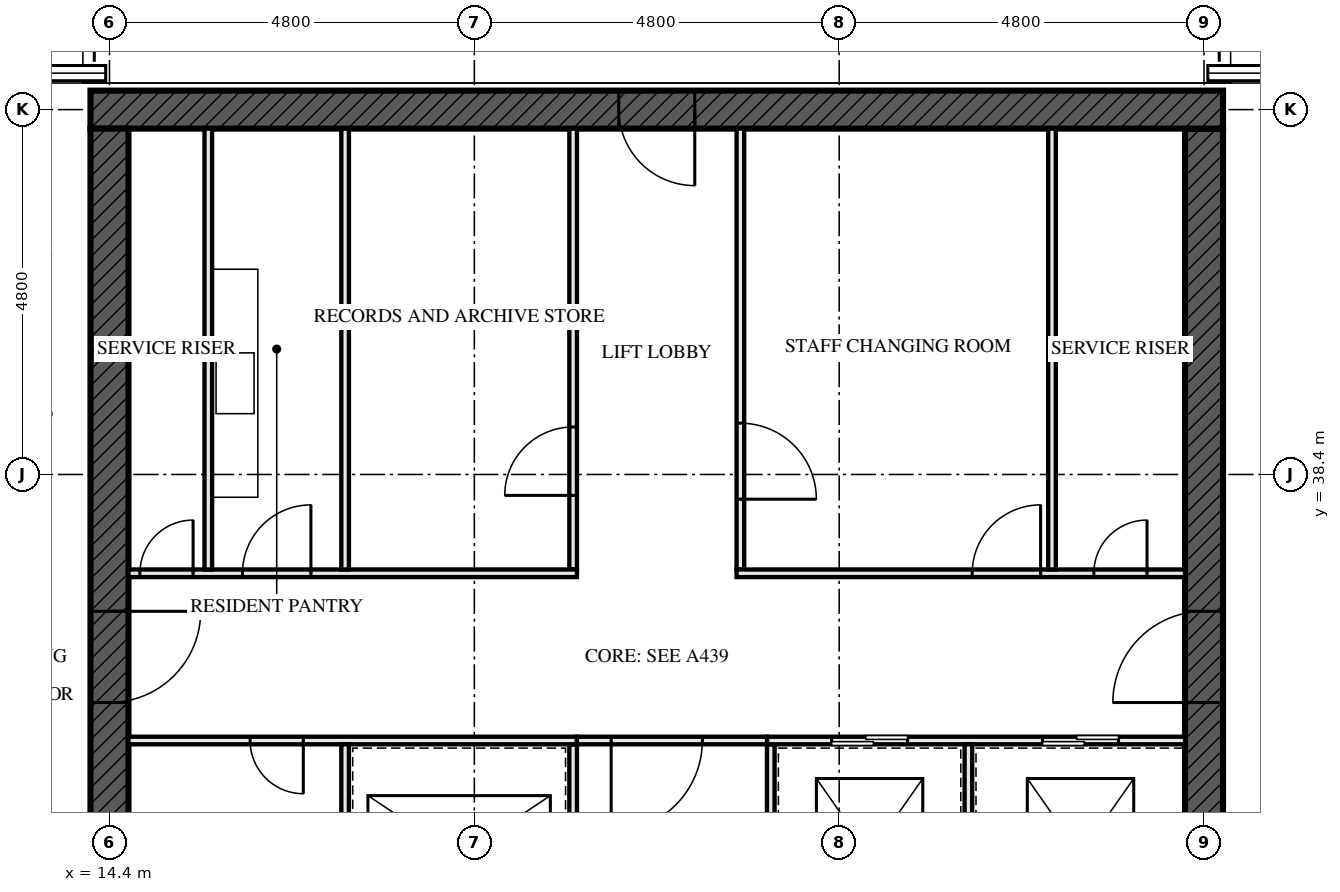
"""IFC4 building model, lengths in metres.
Left out: names, types, materials, properties, quantities, classifications, styles, units other than length and angle.
Written with IfcOpenShell. Run it as: python <this file> out.ifc"""

import sys

from ifc_helpers import new_model, si_unit, direction, frame, frame_2d, origin, place, context, subcontext, project, spatial, rectangle, extrude, element, fill, save


model = new_model("IFC4")
c1 = context("Model", 3, precision=1e-05, world=origin(), true_north=direction((0.0, 1.0)))
c2 = subcontext(c1, "Body", "Model", "MODEL_VIEW")
j1 = project(units=[si_unit("LENGTHUNIT", "METRE"), si_unit("PLANEANGLEUNIT", "RADIAN")], contexts=[c1])
p1 = place(None, origin())
s1 = spatial("IfcSite", under=j1, at=p1, CompositionType="ELEMENT")
p2 = place(p1, origin())
s2 = spatial("IfcBuilding", under=s1, at=p2, CompositionType="ELEMENT")
p3 = place(p2, frame((0.0, 0.0, 194.5)))
s3 = spatial("IfcBuildingStorey", under=s2, at=p3, CompositionType="ELEMENT", Elevation=194.5)
p4 = place(p3, frame((29.05, 43.2, -0.17), z_axis=(0.0, 0.0, 1.0), x_axis=(-1.0, 0.0, 0.0)))
e1 = element("IfcWall", 1, at=p4, inside=s3, PredefinedType="SHEAR", context=c2, shape_type="SweptSolid", body=[
    extrude(rectangle(XDim=14.9, YDim=0.5, at=frame_2d((7.45, 0.0))), origin(), (0.0, 0.0, 1.0), 3.5),
])
p5 = place(p4, frame((6.95, 0.0, 0.17)))
e2 = element("IfcOpeningElement", 2, at=p5, cuts=e1, PredefinedType="OPENING", context=c2, shape_type="SweptSolid", body=[
    extrude(rectangle(XDim=1.0, YDim=2.4, at=frame_2d((0.5, 1.2))), frame((0.0, 0.26, 0.0), z_axis=(0.0, -1.0, 0.0), x_axis=(1.0, 0.0, 0.0)), (0.0, 0.0, 1.0), 0.521),
])
p6 = place(p3, frame((14.4, 42.95, -0.17), z_axis=(0.0, 0.0, 1.0), x_axis=(0.0, -1.0, 0.0)))
e3 = element("IfcWall", 3, at=p6, inside=s3, PredefinedType="SHEAR", context=c2, shape_type="SweptSolid", body=[
    extrude(rectangle(XDim=13.9, YDim=0.5, at=frame_2d((6.95, 0.0))), origin(), (0.0, 0.0, 1.0), 3.5),
])
p7 = place(p6, frame((6.35, 0.0, 0.17)))
e4 = element("IfcOpeningElement", 4, at=p7, cuts=e3, PredefinedType="OPENING", context=c2, shape_type="SweptSolid", body=[
    extrude(rectangle(XDim=1.2, YDim=2.1, at=frame_2d((0.6, 1.05))), frame((0.0, 0.26, 0.0), z_axis=(0.0, -1.0, 0.0), x_axis=(1.0, 0.0, 0.0)), (0.0, 0.0, 1.0), 0.521),
])
p8 = place(p3, frame((28.8, 29.05, -0.17), z_axis=(0.0, 0.0, 1.0), x_axis=(0.0, 1.0, 0.0)))
e5 = element("IfcWall", 5, at=p8, inside=s3, PredefinedType="SHEAR", context=c2, shape_type="SweptSolid", body=[
    extrude(rectangle(XDim=13.9, YDim=0.5, at=frame_2d((6.95, 0.0))), origin(), (0.0, 0.0, 1.0), 3.5),
])
p9 = place(p8, frame((6.35, 0.0, 0.17)))
e6 = element("IfcOpeningElement", 6, at=p9, cuts=e5, PredefinedType="OPENING", context=c2, shape_type="SweptSolid", body=[
    extrude(rectangle(XDim=1.2, YDim=2.1, at=frame_2d((0.6, 1.05))), frame((0.0, 0.26, 0.0), z_axis=(0.0, -1.0, 0.0), x_axis=(1.0, 0.0, 0.0)), (0.0, 0.0, 1.0), 0.521),
])
for number, where, z_axis, x_axis in (
    (7, (15.7, 37.15, 0.0), (0.0, 0.0, 1.0), (0.0, 1.0, 0.0)),
    (8, (26.8, 37.15, 0.0), (0.0, 0.0, 1.0), (0.0, 1.0, 0.0)),
):
    element("IfcWall", number, at=place(p3, frame(where, z_axis=z_axis, x_axis=x_axis)), inside=s3, PredefinedType="SOLIDWALL", context=c2, shape_type="SweptSolid", body=[
        extrude(rectangle(XDim=5.8, YDim=0.1, at=frame_2d((2.9, 0.0))), origin(), (0.0, 0.0, 1.0), 3.33),
    ])
p10 = place(p3, frame((20.5, 29.05, 0.0), z_axis=(0.0, 0.0, 1.0), x_axis=(0.0, 1.0, 0.0)))
e9 = element("IfcWall", 9, at=p10, inside=s3, PredefinedType="SOLIDWALL", context=c2, shape_type="SweptSolid", body=[
    extrude(rectangle(XDim=5.8, YDim=0.1, at=frame_2d((2.9, 0.0))), origin(), (0.0, 0.0, 1.0), 3.33),
])
p11 = place(p10, frame((0.8, 0.0, 0.0)))
e10 = element("IfcOpeningElement", 10, at=p11, cuts=e9, PredefinedType="OPENING", context=c2, shape_type="SweptSolid", body=[
    extrude(rectangle(XDim=1.1, YDim=2.3, at=frame_2d((0.55, 1.15))), frame((0.0, 0.061, 0.0), z_axis=(0.0, -1.0, 0.0), x_axis=(1.0, 0.0, 0.0)), (0.0, 0.0, 1.0), 0.121),
])
p12 = place(p10, frame((3.775, 0.0, 0.0)))
e11 = element("IfcOpeningElement", 11, at=p12, cuts=e9, PredefinedType="OPENING", context=c2, shape_type="SweptSolid", body=[
    extrude(rectangle(XDim=1.1, YDim=2.3, at=frame_2d((0.55, 1.15))), frame((0.0, 0.061, 0.0), z_axis=(0.0, -1.0, 0.0), x_axis=(1.0, 0.0, 0.0)), (0.0, 0.0, 1.0), 0.121),
])
p13 = place(p3, frame((20.5, 37.15, 0.0), z_axis=(0.0, 0.0, 1.0), x_axis=(0.0, 1.0, 0.0)))
e12 = element("IfcWall", 12, at=p13, inside=s3, PredefinedType="SOLIDWALL", context=c2, shape_type="SweptSolid", body=[
    extrude(rectangle(XDim=5.8, YDim=0.1, at=frame_2d((2.9, 0.0))), origin(), (0.0, 0.0, 1.0), 3.33),
])
p14 = place(p13, frame((0.975, 0.0, 0.0)))
e13 = element("IfcOpeningElement", 13, at=p14, cuts=e12, PredefinedType="OPENING", context=c2, shape_type="SweptSolid", body=[
    extrude(rectangle(XDim=0.9, YDim=2.1, at=frame_2d((0.45, 1.05))), frame((0.0, 0.061, 0.0), z_axis=(0.0, -1.0, 0.0), x_axis=(1.0, 0.0, 0.0)), (0.0, 0.0, 1.0), 0.121),
])
p15 = place(p3, frame((22.7, 37.15, 0.0), z_axis=(0.0, 0.0, 1.0), x_axis=(0.0, 1.0, 0.0)))
e14 = element("IfcWall", 14, at=p15, inside=s3, PredefinedType="SOLIDWALL", context=c2, shape_type="SweptSolid", body=[
    extrude(rectangle(XDim=5.8, YDim=0.1, at=frame_2d((2.9, 0.0))), origin(), (0.0, 0.0, 1.0), 3.33),
])
p16 = place(p15, frame((0.925, 0.0, 0.0)))
e15 = element("IfcOpeningElement", 15, at=p16, cuts=e14, PredefinedType="OPENING", context=c2, shape_type="SweptSolid", body=[
    extrude(rectangle(XDim=1.0, YDim=2.1, at=frame_2d((0.5, 1.05))), frame((0.0, 0.061, 0.0), z_axis=(0.0, -1.0, 0.0), x_axis=(1.0, 0.0, 0.0)), (0.0, 0.0, 1.0), 0.121),
])
p17 = place(p3, frame((23.1, 29.05, 0.0), z_axis=(0.0, 0.0, 1.0), x_axis=(0.0, 1.0, 0.0)))
e16 = element("IfcWall", 16, at=p17, inside=s3, PredefinedType="SOLIDWALL", context=c2, shape_type="SweptSolid", body=[
    extrude(rectangle(XDim=5.8, YDim=0.1, at=frame_2d((2.9, 0.0))), origin(), (0.0, 0.0, 1.0), 3.33),
])
p18 = place(p17, frame((1.0, 0.0, 0.0)))
e17 = element("IfcOpeningElement", 17, at=p18, cuts=e16, PredefinedType="OPENING", context=c2, shape_type="SweptSolid", body=[
    extrude(rectangle(XDim=0.7, YDim=2.1, at=frame_2d((0.35, 1.05))), frame((0.0, 0.061, 0.0), z_axis=(0.0, -1.0, 0.0), x_axis=(1.0, 0.0, 0.0)), (0.0, 0.0, 1.0), 0.121),
])
p19 = place(p3, frame((14.65, 34.9, 0.0), z_axis=(0.0, 0.0, 1.0), x_axis=(1.0, 0.0, 0.0)))
e18 = element("IfcWall", 18, at=p19, inside=s3, PredefinedType="SOLIDWALL", context=c2, shape_type="SweptSolid", body=[
    extrude(rectangle(XDim=5.9, YDim=0.1, at=frame_2d((2.95, 0.0))), origin(), (0.0, 0.0, 1.0), 3.33),
])
p20 = place(p19, frame((1.6, 0.0, 0.0)))
e19 = element("IfcOpeningElement", 19, at=p20, cuts=e18, PredefinedType="OPENING", context=c2, shape_type="SweptSolid", body=[
    extrude(rectangle(XDim=0.7, YDim=2.1, at=frame_2d((0.35, 1.05))), frame((0.0, 0.061, 0.0), z_axis=(0.0, -1.0, 0.0), x_axis=(1.0, 0.0, 0.0)), (0.0, 0.0, 1.0), 0.121),
])
p21 = place(p3, frame((23.05, 34.9, 0.0), z_axis=(0.0, 0.0, 1.0), x_axis=(1.0, 0.0, 0.0)))
e20 = element("IfcWall", 20, at=p21, inside=s3, PredefinedType="SOLIDWALL", context=c2, shape_type="SweptSolid", body=[
    extrude(rectangle(XDim=5.5, YDim=0.1, at=frame_2d((2.75, 0.0))), origin(), (0.0, 0.0, 1.0), 3.33),
])
p22 = place(p21, frame((0.85, 0.0, 0.0)))
e21 = element("IfcOpeningElement", 21, at=p22, cuts=e20, PredefinedType="OPENING", context=c2, shape_type="SweptSolid", body=[
    extrude(rectangle(XDim=1.0, YDim=2.1, at=frame_2d((0.5, 1.05))), frame((0.0, 0.061, 0.0), z_axis=(0.0, -1.0, 0.0), x_axis=(1.0, 0.0, 0.0)), (0.0, 0.0, 1.0), 0.121),
])
p23 = place(p21, frame((3.625, 0.0, 0.0)))
e22 = element("IfcOpeningElement", 22, at=p23, cuts=e20, PredefinedType="OPENING", context=c2, shape_type="SweptSolid", body=[
    extrude(rectangle(XDim=1.0, YDim=2.1, at=frame_2d((0.5, 1.05))), frame((0.0, 0.061, 0.0), z_axis=(0.0, -1.0, 0.0), x_axis=(1.0, 0.0, 0.0)), (0.0, 0.0, 1.0), 0.121),
])
p24 = place(p3, frame((14.65, 37.1, 0.0), z_axis=(0.0, 0.0, 1.0), x_axis=(1.0, 0.0, 0.0)))
e23 = element("IfcWall", 23, at=p24, inside=s3, PredefinedType="SOLIDWALL", context=c2, shape_type="SweptSolid", body=[
    extrude(rectangle(XDim=5.9, YDim=0.1, at=frame_2d((2.95, 0.0))), origin(), (0.0, 0.0, 1.0), 3.33),
])
p25 = place(p24, frame((0.15, 0.0, 0.0)))
e24 = element("IfcOpeningElement", 24, at=p25, cuts=e23, PredefinedType="OPENING", context=c2, shape_type="SweptSolid", body=[
    extrude(rectangle(XDim=0.7, YDim=2.1, at=frame_2d((0.35, 1.05))), frame((0.0, 0.061, 0.0), z_axis=(0.0, -1.0, 0.0), x_axis=(1.0, 0.0, 0.0)), (0.0, 0.0, 1.0), 0.121),
])
p26 = place(p24, frame((1.5, 0.0, 0.0)))
e25 = element("IfcOpeningElement", 25, at=p26, cuts=e23, PredefinedType="OPENING", context=c2, shape_type="SweptSolid", body=[
    extrude(rectangle(XDim=0.9, YDim=2.1, at=frame_2d((0.45, 1.05))), frame((0.0, 0.061, 0.0), z_axis=(0.0, -1.0, 0.0), x_axis=(1.0, 0.0, 0.0)), (0.0, 0.0, 1.0), 0.121),
])
p27 = place(p3, frame((22.65, 37.1, 0.0), z_axis=(0.0, 0.0, 1.0), x_axis=(1.0, 0.0, 0.0)))
e26 = element("IfcWall", 26, at=p27, inside=s3, PredefinedType="SOLIDWALL", context=c2, shape_type="SweptSolid", body=[
    extrude(rectangle(XDim=5.9, YDim=0.1, at=frame_2d((2.95, 0.0))), origin(), (0.0, 0.0, 1.0), 3.33),
])
p28 = place(p27, frame((3.1, 0.0, 0.0)))
e27 = element("IfcOpeningElement", 27, at=p28, cuts=e26, PredefinedType="OPENING", context=c2, shape_type="SweptSolid", body=[
    extrude(rectangle(XDim=0.9, YDim=2.1, at=frame_2d((0.45, 1.05))), frame((0.0, 0.061, 0.0), z_axis=(0.0, -1.0, 0.0), x_axis=(1.0, 0.0, 0.0)), (0.0, 0.0, 1.0), 0.121),
])
p29 = place(p27, frame((4.7, 0.0, 0.0)))
e28 = element("IfcOpeningElement", 28, at=p29, cuts=e26, PredefinedType="OPENING", context=c2, shape_type="SweptSolid", body=[
    extrude(rectangle(XDim=0.7, YDim=2.1, at=frame_2d((0.35, 1.05))), frame((0.0, 0.061, 0.0), z_axis=(0.0, -1.0, 0.0), x_axis=(1.0, 0.0, 0.0)), (0.0, 0.0, 1.0), 0.121),
])
p30 = place(p3, frame((20.55, 34.9, 0.0), z_axis=(0.0, 0.0, 1.0), x_axis=(1.0, 0.0, 0.0)))
e29 = element("IfcWall", 29, at=p30, inside=s3, PredefinedType="SOLIDWALL", context=c2, shape_type="SweptSolid", body=[
    extrude(rectangle(XDim=2.5, YDim=0.1, at=frame_2d((1.25, 0.0))), origin(), (0.0, 0.0, 1.0), 3.33),
])
p31 = place(p30, frame((0.45, 0.0, 0.0)))
e30 = element("IfcOpeningElement", 30, at=p31, cuts=e29, PredefinedType="OPENING", context=c2, shape_type="SweptSolid", body=[
    extrude(rectangle(XDim=1.2, YDim=2.1, at=frame_2d((0.6, 1.05))), frame((0.0, 0.061, 0.0), z_axis=(0.0, -1.0, 0.0), x_axis=(1.0, 0.0, 0.0)), (0.0, 0.0, 1.0), 0.121),
])
for number, where, z_axis, x_axis in (
    (31, (17.5, 29.05, 0.0), (0.0, 0.0, 1.0), (0.0, 1.0, 0.0)),
    (32, (17.5, 37.15, 0.0), (0.0, 0.0, 1.0), (0.0, 1.0, 0.0)),
):
    element("IfcWall", number, at=place(p3, frame(where, z_axis=z_axis, x_axis=x_axis)), inside=s3, PredefinedType="SOLIDWALL", context=c2, shape_type="SweptSolid", body=[
        extrude(rectangle(XDim=5.8, YDim=0.1, at=frame_2d((2.9, 0.0))), origin(), (0.0, 0.0, 1.0), 3.33),
    ])
p32 = place(p3, frame((25.7, 31.95, 0.0), z_axis=(0.0, 0.0, 1.0), x_axis=(0.0, 1.0, 0.0)))
e33 = element("IfcWall", 33, at=p32, inside=s3, PredefinedType="SOLIDWALL", context=c2, shape_type="SweptSolid", body=[
    extrude(rectangle(XDim=2.9, YDim=0.1, at=frame_2d((1.45, 0.0))), origin(), (0.0, 0.0, 1.0), 3.33),
])
p33 = place(p14, origin())
e34 = element("IfcDoor", 34, at=p33, inside=s3, OperationType="SINGLE_SWING_RIGHT", PredefinedType="DOOR", context=c2, shape_type="SweptSolid", body=[
    extrude(rectangle(XDim=0.9, YDim=2.1, at=frame_2d((0.45, 1.05))), frame((0.0, 0.027, 0.0), z_axis=(0.0, -1.0, 0.0), x_axis=(1.0, 0.0, 0.0)), (0.0, 0.0, 1.0), 0.054),
])
fill(e13, e34)
p34 = place(p16, frame((1.0, 0.0, 0.0), z_axis=(0.0, 0.0, 1.0), x_axis=(-1.0, 0.0, 0.0)))
e35 = element("IfcDoor", 35, at=p34, inside=s3, OperationType="SINGLE_SWING_LEFT", PredefinedType="DOOR", context=c2, shape_type="SweptSolid", body=[
    extrude(rectangle(XDim=1.0, YDim=2.1, at=frame_2d((0.5, 1.05))), frame((0.0, 0.027, 0.0), z_axis=(0.0, -1.0, 0.0), x_axis=(1.0, 0.0, 0.0)), (0.0, 0.0, 1.0), 0.054),
])
fill(e15, e35)
p35 = place(p20, frame((0.7, 0.0, 0.0), z_axis=(0.0, 0.0, 1.0), x_axis=(-1.0, 0.0, 0.0)))
e36 = element("IfcDoor", 36, at=p35, inside=s3, OperationType="SINGLE_SWING_RIGHT", PredefinedType="DOOR", context=c2, shape_type="SweptSolid", body=[
    extrude(rectangle(XDim=0.7, YDim=2.1, at=frame_2d((0.35, 1.05))), frame((0.0, 0.027, 0.0), z_axis=(0.0, -1.0, 0.0), x_axis=(1.0, 0.0, 0.0)), (0.0, 0.0, 1.0), 0.054),
])
fill(e19, e36)
p36 = place(p22, origin())
e37 = element("IfcDoor", 37, at=p36, inside=s3, OperationType="SLIDING_TO_LEFT", PredefinedType="DOOR", context=c2, shape_type="SweptSolid", body=[
    extrude(rectangle(XDim=1.0, YDim=2.1, at=frame_2d((0.5, 1.05))), frame((0.0, 0.05, 0.0), z_axis=(0.0, -1.0, 0.0), x_axis=(1.0, 0.0, 0.0)), (0.0, 0.0, 1.0), 0.1),
])
fill(e21, e37)
p37 = place(p23, origin())
e38 = element("IfcDoor", 38, at=p37, inside=s3, OperationType="SLIDING_TO_LEFT", PredefinedType="DOOR", context=c2, shape_type="SweptSolid", body=[
    extrude(rectangle(XDim=1.0, YDim=2.1, at=frame_2d((0.5, 1.05))), frame((0.0, 0.05, 0.0), z_axis=(0.0, -1.0, 0.0), x_axis=(1.0, 0.0, 0.0)), (0.0, 0.0, 1.0), 0.1),
])
fill(e22, e38)
p38 = place(p25, origin())
e39 = element("IfcDoor", 39, at=p38, inside=s3, OperationType="SINGLE_SWING_LEFT", PredefinedType="DOOR", context=c2, shape_type="SweptSolid", body=[
    extrude(rectangle(XDim=0.7, YDim=2.1, at=frame_2d((0.35, 1.05))), frame((0.0, 0.027, 0.0), z_axis=(0.0, -1.0, 0.0), x_axis=(1.0, 0.0, 0.0)), (0.0, 0.0, 1.0), 0.054),
])
fill(e24, e39)
p39 = place(p26, origin())
e40 = element("IfcDoor", 40, at=p39, inside=s3, OperationType="SINGLE_SWING_LEFT", PredefinedType="DOOR", context=c2, shape_type="SweptSolid", body=[
    extrude(rectangle(XDim=0.9, YDim=2.1, at=frame_2d((0.45, 1.05))), frame((0.0, 0.027, 0.0), z_axis=(0.0, -1.0, 0.0), x_axis=(1.0, 0.0, 0.0)), (0.0, 0.0, 1.0), 0.054),
])
fill(e25, e40)
p40 = place(p28, origin())
e41 = element("IfcDoor", 41, at=p40, inside=s3, OperationType="SINGLE_SWING_LEFT", PredefinedType="DOOR", context=c2, shape_type="SweptSolid", body=[
    extrude(rectangle(XDim=0.9, YDim=2.1, at=frame_2d((0.45, 1.05))), frame((0.0, 0.027, 0.0), z_axis=(0.0, -1.0, 0.0), x_axis=(1.0, 0.0, 0.0)), (0.0, 0.0, 1.0), 0.054),
])
fill(e27, e41)
p41 = place(p29, origin())
e42 = element("IfcDoor", 42, at=p41, inside=s3, OperationType="SINGLE_SWING_LEFT", PredefinedType="DOOR", context=c2, shape_type="SweptSolid", body=[
    extrude(rectangle(XDim=0.7, YDim=2.1, at=frame_2d((0.35, 1.05))), frame((0.0, 0.027, 0.0), z_axis=(0.0, -1.0, 0.0), x_axis=(1.0, 0.0, 0.0)), (0.0, 0.0, 1.0), 0.054),
])
fill(e28, e42)
p42 = place(p31, frame((1.2, 0.0, 0.0), z_axis=(0.0, 0.0, 1.0), x_axis=(-1.0, 0.0, 0.0)))
e43 = element("IfcDoor", 43, at=p42, inside=s3, OperationType="SINGLE_SWING_LEFT", PredefinedType="DOOR", context=c2, shape_type="SweptSolid", body=[
    extrude(rectangle(XDim=1.2, YDim=2.1, at=frame_2d((0.6, 1.05))), frame((0.0, 0.027, 0.0), z_axis=(0.0, -1.0, 0.0), x_axis=(1.0, 0.0, 0.0)), (0.0, 0.0, 1.0), 0.054),
])
fill(e30, e43)
p43 = place(p7, origin())
e44 = element("IfcDoor", 44, at=p43, inside=s3, OperationType="SINGLE_SWING_LEFT", PredefinedType="DOOR", context=c2, shape_type="SweptSolid", body=[
    extrude(rectangle(XDim=1.2, YDim=2.1, at=frame_2d((0.6, 1.05))), frame((0.0, 0.027, 0.0), z_axis=(0.0, -1.0, 0.0), x_axis=(1.0, 0.0, 0.0)), (0.0, 0.0, 1.0), 0.054),
])
fill(e4, e44)
p44 = place(p9, origin())
e45 = element("IfcDoor", 45, at=p44, inside=s3, OperationType="SINGLE_SWING_LEFT", PredefinedType="DOOR", context=c2, shape_type="SweptSolid", body=[
    extrude(rectangle(XDim=1.2, YDim=2.1, at=frame_2d((0.6, 1.05))), frame((0.0, 0.027, 0.0), z_axis=(0.0, -1.0, 0.0), x_axis=(1.0, 0.0, 0.0)), (0.0, 0.0, 1.0), 0.054),
])
fill(e6, e45)
p45 = place(p5, origin())
e46 = element("IfcDoor", 46, at=p45, inside=s3, OperationType="SINGLE_SWING_LEFT", PredefinedType="DOOR", context=c2, shape_type="SweptSolid", body=[
    extrude(rectangle(XDim=1.0, YDim=2.4, at=frame_2d((0.5, 1.2))), frame((0.0, 0.035, 0.0), z_axis=(0.0, -1.0, 0.0), x_axis=(1.0, 0.0, 0.0)), (0.0, 0.0, 1.0), 0.07),
])
fill(e2, e46)
save(model, sys.argv[1])
